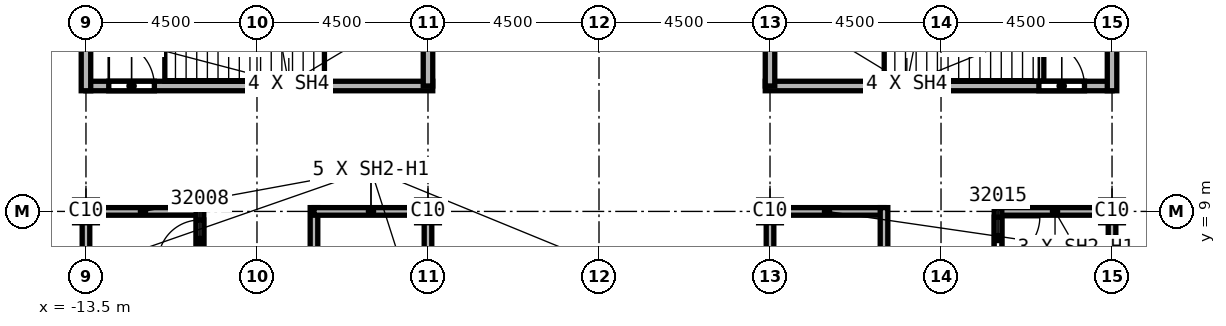
"""IFC4 building model, lengths in metres.
Left out: names, types, materials, properties, quantities, classifications, styles, units other than length and angle.
Written with IfcOpenShell. Run it as: python <this file> out.ifc"""

import sys

from ifc_helpers import new_model, si_unit, direction, frame, frame_2d, origin, origin_2d, place, context, subcontext, project, spatial, rectangle, extrude, element, fill, save


model = new_model("IFC4")
c1 = context("Model", 3, precision=1e-05, world=origin(), true_north=direction((0.0, 1.0)))
c2 = subcontext(c1, "Body", "Model", "MODEL_VIEW")
j1 = project(units=[si_unit("LENGTHUNIT", "METRE"), si_unit("PLANEANGLEUNIT", "RADIAN")], contexts=[c1])
p1 = place(None, origin())
s1 = spatial("IfcSite", under=j1, at=p1, CompositionType="ELEMENT")
p2 = place(p1, origin())
s2 = spatial("IfcBuilding", under=s1, at=p2, CompositionType="ELEMENT")
p3 = place(p2, frame((0.0, 0.0, 356.0)))
s3 = spatial("IfcBuildingStorey", under=s2, at=p3, CompositionType="ELEMENT", Elevation=356.0)
for number, where, z_axis, x_axis in (
    (1, (4.5, 9.0, 0.0), (0.0, 0.0, 1.0), (1.0, 0.0, 0.0)),
    (2, (13.5, 9.0, 0.0), (0.0, 0.0, 1.0), (1.0, 0.0, 0.0)),
    (3, (-4.5, 9.0, 0.0), (0.0, 0.0, 1.0), (1.0, 0.0, 0.0)),
    (4, (-13.5, 9.0, 0.0), (0.0, 0.0, 1.0), (1.0, 0.0, 0.0)),
):
    element("IfcColumn", number, at=place(p3, frame(where, z_axis=z_axis, x_axis=x_axis)), inside=s3, PredefinedType="COLUMN", context=c2, shape_type="SweptSolid", body=[
        extrude(rectangle(XDim=0.6, YDim=0.6, at=origin_2d()), origin(), (0.0, 0.0, 1.0), 4.6),
    ])
p4 = place(p3, frame((-13.5, 6.0, 0.0), z_axis=(0.0, 0.0, 1.0), x_axis=(0.0, 1.0, 0.0)))
e5 = element("IfcWall", 5, at=p4, inside=s3, PredefinedType="SOLIDWALL", context=c2, shape_type="SweptSolid", body=[
    extrude(rectangle(XDim=3.1, YDim=0.2, at=frame_2d((1.55, 0.0))), origin(), (0.0, 0.0, 1.0), 3.838),
])
p5 = place(p3, frame((-13.5, 9.0, 0.0), z_axis=(0.0, 0.0, 1.0), x_axis=(1.0, 0.0, 0.0)))
e6 = element("IfcWall", 6, at=p5, inside=s3, PredefinedType="SOLIDWALL", context=c2, shape_type="SweptSolid", body=[
    extrude(rectangle(XDim=3.0, YDim=0.2, at=frame_2d((1.5, 0.0))), origin(), (0.0, 0.0, 1.0), 3.838),
])
p6 = place(p3, frame((-10.5, 5.925, 0.0), z_axis=(0.0, 0.0, 1.0), x_axis=(0.0, 1.0, 0.0)))
e7 = element("IfcWall", 7, at=p6, inside=s3, PredefinedType="SOLIDWALL", context=c2, shape_type="SweptSolid", body=[
    extrude(rectangle(XDim=3.175, YDim=0.2, at=frame_2d((1.587, 0.0))), origin(), (0.0, 0.0, 1.0), 4.15),
])
p7 = place(p6, frame((1.75, 0.0, 0.0)))
e8 = element("IfcOpeningElement", 8, at=p7, cuts=e7, PredefinedType="OPENING", context=c2, shape_type="SweptSolid", body=[
    extrude(rectangle(XDim=1.1, YDim=2.1, at=frame_2d((0.55, 1.05))), frame((0.0, 0.1, 0.0), z_axis=(0.0, -1.0, 0.0), x_axis=(1.0, 0.0, 0.0)), (0.0, 0.0, 1.0), 0.2),
])
p8 = place(p3, frame((-7.5, 2.875, 0.0), z_axis=(0.0, 0.0, 1.0), x_axis=(0.0, 1.0, 0.0)))
e9 = element("IfcWall", 9, at=p8, inside=s3, PredefinedType="SOLIDWALL", context=c2, shape_type="SweptSolid", body=[
    extrude(rectangle(XDim=6.225, YDim=0.2, at=frame_2d((3.113, 0.0))), origin(), (0.0, 0.0, 1.0), 4.15),
])
p9 = place(p3, frame((-7.5, 9.0, 0.0), z_axis=(0.0, 0.0, 1.0), x_axis=(1.0, 0.0, 0.0)))
e10 = element("IfcWall", 10, at=p9, inside=s3, PredefinedType="SOLIDWALL", context=c2, shape_type="SweptSolid", body=[
    extrude(rectangle(XDim=3.0, YDim=0.2, at=frame_2d((1.5, 0.0))), origin(), (0.0, 0.0, 1.0), 3.838),
])
p10 = place(p3, frame((-4.5, 9.1, 0.0), z_axis=(0.0, 0.0, 1.0), x_axis=(0.0, -1.0, 0.0)))
e11 = element("IfcWall", 11, at=p10, inside=s3, PredefinedType="SOLIDWALL", context=c2, shape_type="SweptSolid", body=[
    extrude(rectangle(XDim=18.2, YDim=0.2, at=frame_2d((9.1, 0.0))), origin(), (0.0, 0.0, 1.0), 3.838),
])
p11 = place(p10, frame((12.35, 0.0, 0.0)))
e12 = element("IfcOpeningElement", 12, at=p11, cuts=e11, PredefinedType="OPENING", context=c2, shape_type="SweptSolid", body=[
    extrude(rectangle(XDim=1.1, YDim=2.1, at=frame_2d((0.55, 1.05))), frame((0.0, 0.1, 0.0), z_axis=(0.0, -1.0, 0.0), x_axis=(1.0, 0.0, 0.0)), (0.0, 0.0, 1.0), 0.2),
])
p12 = place(p10, frame((7.15, 0.0, 0.0)))
e13 = element("IfcOpeningElement", 13, at=p12, cuts=e11, PredefinedType="OPENING", context=c2, shape_type="SweptSolid", body=[
    extrude(rectangle(XDim=1.1, YDim=2.1, at=frame_2d((0.55, 1.05))), frame((0.0, 0.1, 0.0), z_axis=(0.0, -1.0, 0.0), x_axis=(1.0, 0.0, 0.0)), (0.0, 0.0, 1.0), 0.2),
])
p13 = place(p3, frame((4.5, -9.1, 0.0), z_axis=(0.0, 0.0, 1.0), x_axis=(0.0, 1.0, 0.0)))
e14 = element("IfcWall", 14, at=p13, inside=s3, PredefinedType="SOLIDWALL", context=c2, shape_type="SweptSolid", body=[
    extrude(rectangle(XDim=18.2, YDim=0.2, at=frame_2d((9.1, 0.0))), origin(), (0.0, 0.0, 1.0), 3.838),
])
p14 = place(p13, frame((2.5, 0.0, 0.0)))
e15 = element("IfcOpeningElement", 15, at=p14, cuts=e14, PredefinedType="OPENING", context=c2, shape_type="SweptSolid", body=[
    extrude(rectangle(XDim=1.1, YDim=2.1, at=frame_2d((0.55, 1.05))), frame((0.0, 0.1, 0.0), z_axis=(0.0, -1.0, 0.0), x_axis=(1.0, 0.0, 0.0)), (0.0, 0.0, 1.0), 0.2),
])
p15 = place(p13, frame((10.7, 0.0, 0.0)))
e16 = element("IfcOpeningElement", 16, at=p15, cuts=e14, PredefinedType="OPENING", context=c2, shape_type="SweptSolid", body=[
    extrude(rectangle(XDim=1.1, YDim=2.1, at=frame_2d((0.55, 1.05))), frame((0.0, 0.1, 0.0), z_axis=(0.0, -1.0, 0.0), x_axis=(1.0, 0.0, 0.0)), (0.0, 0.0, 1.0), 0.2),
])
p16 = place(p3, frame((4.5, 9.0, 0.0), z_axis=(0.0, 0.0, 1.0), x_axis=(1.0, 0.0, 0.0)))
e17 = element("IfcWall", 17, at=p16, inside=s3, PredefinedType="SOLIDWALL", context=c2, shape_type="SweptSolid", body=[
    extrude(rectangle(XDim=3.0, YDim=0.2, at=frame_2d((1.5, 0.0))), origin(), (0.0, 0.0, 1.0), 3.838),
])
p17 = place(p3, frame((7.5, 9.1, 0.0), z_axis=(0.0, 0.0, 1.0), x_axis=(0.0, -1.0, 0.0)))
e18 = element("IfcWall", 18, at=p17, inside=s3, PredefinedType="SOLIDWALL", context=c2, shape_type="SweptSolid", body=[
    extrude(rectangle(XDim=6.225, YDim=0.2, at=frame_2d((3.113, 0.0))), origin(), (0.0, 0.0, 1.0), 4.15),
])
p18 = place(p3, frame((10.5, 9.0, 0.0), z_axis=(0.0, 0.0, 1.0), x_axis=(1.0, 0.0, 0.0)))
e19 = element("IfcWall", 19, at=p18, inside=s3, PredefinedType="SOLIDWALL", context=c2, shape_type="SweptSolid", body=[
    extrude(rectangle(XDim=3.0, YDim=0.2, at=frame_2d((1.5, 0.0))), origin(), (0.0, 0.0, 1.0), 3.838),
])
p19 = place(p3, frame((10.5, 9.1, 0.0), z_axis=(0.0, 0.0, 1.0), x_axis=(0.0, -1.0, 0.0)))
e20 = element("IfcWall", 20, at=p19, inside=s3, PredefinedType="SOLIDWALL", context=c2, shape_type="SweptSolid", body=[
    extrude(rectangle(XDim=3.225, YDim=0.2, at=frame_2d((1.613, 0.0))), origin(), (0.0, 0.0, 1.0), 4.15),
])
p20 = place(p19, frame((0.25, 0.0, 0.0)))
e21 = element("IfcOpeningElement", 21, at=p20, cuts=e20, PredefinedType="OPENING", context=c2, shape_type="SweptSolid", body=[
    extrude(rectangle(XDim=1.1, YDim=2.1, at=frame_2d((0.55, 1.05))), frame((0.0, 0.1, 0.0), z_axis=(0.0, -1.0, 0.0), x_axis=(1.0, 0.0, 0.0)), (0.0, 0.0, 1.0), 0.2),
])
p21 = place(p3, frame((13.5, 9.1, 0.0), z_axis=(0.0, 0.0, 1.0), x_axis=(0.0, -1.0, 0.0)))
e22 = element("IfcWall", 22, at=p21, inside=s3, PredefinedType="SOLIDWALL", context=c2, shape_type="SweptSolid", body=[
    extrude(rectangle(XDim=3.1, YDim=0.2, at=frame_2d((1.55, 0.0))), origin(), (0.0, 0.0, 1.0), 3.838),
])
p22 = place(p3, frame((-13.5, 12.3, 0.0), z_axis=(0.0, 0.0, 1.0), x_axis=(1.0, 0.0, 0.0)))
e23 = element("IfcWall", 23, at=p22, inside=s3, PredefinedType="SOLIDWALL", context=c2, shape_type="SweptSolid", body=[
    extrude(rectangle(XDim=9.125, YDim=0.25, at=frame_2d((4.562, 0.0))), origin(), (0.0, 0.0, 1.0), 4.15),
])
p23 = place(p22, frame((0.6, 0.0, 0.0)))
e24 = element("IfcOpeningElement", 24, at=p23, cuts=e23, PredefinedType="OPENING", context=c2, shape_type="SweptSolid", body=[
    extrude(rectangle(XDim=1.2, YDim=2.1, at=frame_2d((0.6, 1.05))), frame((0.0, 0.125, 0.0), z_axis=(0.0, -1.0, 0.0), x_axis=(1.0, 0.0, 0.0)), (0.0, 0.0, 1.0), 0.25),
])
p24 = place(p3, frame((-13.5, 12.175, 0.0), z_axis=(0.0, 0.0, 1.0), x_axis=(0.0, 1.0, 0.0)))
e25 = element("IfcWall", 25, at=p24, inside=s3, PredefinedType="SOLIDWALL", context=c2, shape_type="SweptSolid", body=[
    extrude(rectangle(XDim=4.75, YDim=0.25, at=frame_2d((2.375, 0.0))), origin(), (0.0, 0.0, 1.0), 4.15),
])
p25 = place(p3, frame((-4.5, 16.925, 0.0), z_axis=(0.0, 0.0, 1.0), x_axis=(0.0, -1.0, 0.0)))
e26 = element("IfcWall", 26, at=p25, inside=s3, PredefinedType="SOLIDWALL", context=c2, shape_type="SweptSolid", body=[
    extrude(rectangle(XDim=4.625, YDim=0.25, at=frame_2d((2.312, 0.0))), origin(), (0.0, 0.0, 1.0), 4.15),
])
p26 = place(p3, frame((4.375, 12.3, 0.0), z_axis=(0.0, 0.0, 1.0), x_axis=(1.0, 0.0, 0.0)))
e27 = element("IfcWall", 27, at=p26, inside=s3, PredefinedType="SOLIDWALL", context=c2, shape_type="SweptSolid", body=[
    extrude(rectangle(XDim=9.125, YDim=0.25, at=frame_2d((4.562, 0.0))), origin(), (0.0, 0.0, 1.0), 4.15),
])
p27 = place(p26, frame((7.2, 0.0, 0.0)))
e28 = element("IfcOpeningElement", 28, at=p27, cuts=e27, PredefinedType="OPENING", context=c2, shape_type="SweptSolid", body=[
    extrude(rectangle(XDim=1.2, YDim=2.1, at=frame_2d((0.6, 1.05))), frame((0.0, 0.125, 0.0), z_axis=(0.0, -1.0, 0.0), x_axis=(1.0, 0.0, 0.0)), (0.0, 0.0, 1.0), 0.25),
])
p28 = place(p3, frame((4.5, 12.3, 0.0), z_axis=(0.0, 0.0, 1.0), x_axis=(0.0, 1.0, 0.0)))
e29 = element("IfcWall", 29, at=p28, inside=s3, PredefinedType="SOLIDWALL", context=c2, shape_type="SweptSolid", body=[
    extrude(rectangle(XDim=4.625, YDim=0.25, at=frame_2d((2.312, 0.0))), origin(), (0.0, 0.0, 1.0), 4.15),
])
p29 = place(p3, frame((13.5, 12.175, 0.0), z_axis=(0.0, 0.0, 1.0), x_axis=(0.0, 1.0, 0.0)))
e30 = element("IfcWall", 30, at=p29, inside=s3, PredefinedType="SOLIDWALL", context=c2, shape_type="SweptSolid", body=[
    extrude(rectangle(XDim=4.75, YDim=0.25, at=frame_2d((2.375, 0.0))), origin(), (0.0, 0.0, 1.0), 4.15),
])
p30 = place(p7, origin())
e31 = element("IfcDoor", 31, at=p30, inside=s3, OperationType="SINGLE_SWING_LEFT", PredefinedType="DOOR", context=c2, shape_type="SweptSolid", body=[
    extrude(rectangle(XDim=1.1, YDim=2.1, at=frame_2d((0.55, 1.05))), frame((0.0, 0.025, 0.0), z_axis=(0.0, -1.0, 0.0), x_axis=(1.0, 0.0, 0.0)), (0.0, 0.0, 1.0), 0.05),
])
fill(e8, e31)
p31 = place(p20, origin())
e32 = element("IfcDoor", 32, at=p31, inside=s3, OperationType="SINGLE_SWING_RIGHT", PredefinedType="DOOR", context=c2, shape_type="SweptSolid", body=[
    extrude(rectangle(XDim=1.1, YDim=2.1, at=frame_2d((0.55, 1.05))), frame((0.0, 0.025, 0.0), z_axis=(0.0, -1.0, 0.0), x_axis=(1.0, 0.0, 0.0)), (0.0, 0.0, 1.0), 0.05),
])
fill(e21, e32)
p32 = place(p23, origin())
e33 = element("IfcDoor", 33, at=p32, inside=s3, OperationType="SINGLE_SWING_LEFT", PredefinedType="DOOR", context=c2, shape_type="SweptSolid", body=[
    extrude(rectangle(XDim=1.2, YDim=2.1, at=frame_2d((0.6, 1.05))), frame((0.0, 0.025, 0.0), z_axis=(0.0, -1.0, 0.0), x_axis=(1.0, 0.0, 0.0)), (0.0, 0.0, 1.0), 0.05),
])
fill(e24, e33)
p33 = place(p27, origin())
e34 = element("IfcDoor", 34, at=p33, inside=s3, OperationType="SINGLE_SWING_LEFT", PredefinedType="DOOR", context=c2, shape_type="SweptSolid", body=[
    extrude(rectangle(XDim=1.2, YDim=2.1, at=frame_2d((0.6, 1.05))), frame((0.0, 0.025, 0.0), z_axis=(0.0, -1.0, 0.0), x_axis=(1.0, 0.0, 0.0)), (0.0, 0.0, 1.0), 0.05),
])
fill(e28, e34)
save(model, sys.argv[1])
